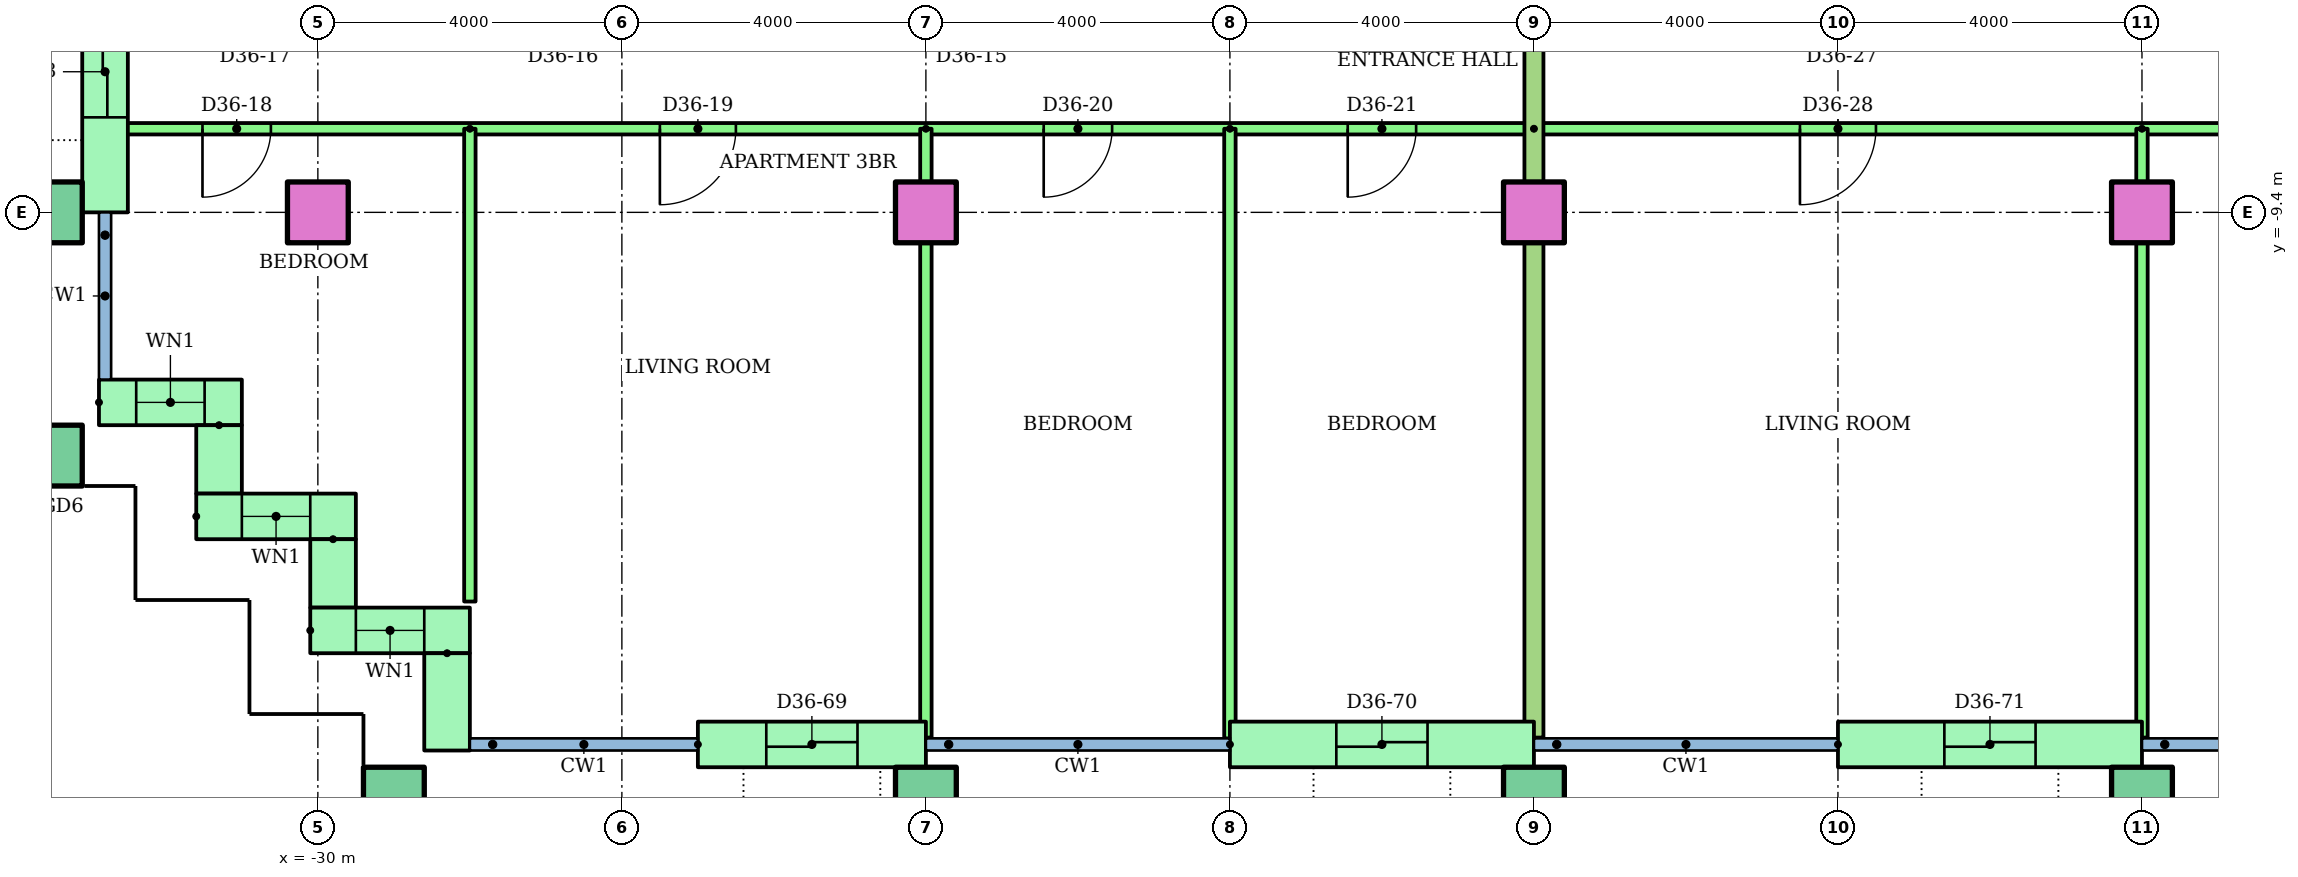
"""IFC4 building model, lengths in metres.
Left out: names, types, materials, properties, quantities, classifications, styles, units other than length and angle.
Written with IfcOpenShell. Run it as: python <this file> out.ifc"""

import sys

from ifc_helpers import new_model, si_unit, direction, frame, frame_2d, origin, origin_2d, place, context, subcontext, project, spatial, rectangle, hollow_rectangle, extrude, element, fill, save


model = new_model("IFC4")
c1 = context("Model", 3, precision=1e-05, world=origin(), true_north=direction((0.0, 1.0)))
c2 = subcontext(c1, "Body", "Model", "MODEL_VIEW")
j1 = project(units=[si_unit("LENGTHUNIT", "METRE"), si_unit("PLANEANGLEUNIT", "RADIAN")], contexts=[c1])
p1 = place(None, origin())
s1 = spatial("IfcSite", under=j1, at=p1, CompositionType="ELEMENT")
p2 = place(p1, origin())
s2 = spatial("IfcBuilding", under=s1, at=p2, CompositionType="ELEMENT")
p3 = place(p2, frame((0.0, 0.0, 139.0)))
s3 = spatial("IfcBuildingStorey", under=s2, at=p3, CompositionType="ELEMENT", Elevation=139.0)
for number, where in (
    (1, (-29.0, -17.1, 0.0)),
    (2, (-22.0, -17.1, 0.0)),
    (3, (-14.0, -17.1, 0.0)),
    (4, (-6.0, -17.1, 0.0)),
    (5, (-33.5, -12.6, 0.0)),
    (6, (-33.5, -9.4, 0.0)),
):
    element("IfcColumn", number, at=place(p3, frame(where)), inside=s3, PredefinedType="COLUMN", context=c2, shape_type="SweptSolid", body=[
        extrude(hollow_rectangle(XDim=0.8, YDim=0.8, WallThickness=0.04, at=origin_2d()), origin(), (0.0, 0.0, 1.0), 3.2),
    ])
for number, where in (
    (7, (-30.0, -9.4, 0.0)),
    (8, (-22.0, -9.4, 0.0)),
    (9, (-14.0, -9.4, 0.0)),
    (10, (-6.0, -9.4, 0.0)),
):
    element("IfcColumn", number, at=place(p3, frame(where)), inside=s3, PredefinedType="COLUMN", context=c2, shape_type="SweptSolid", body=[
        extrude(rectangle(XDim=0.8, YDim=0.8, at=origin_2d()), origin(), (0.0, 0.0, 1.0), 3.2),
    ])
p4 = place(p3, frame((-32.8, -5.7, 0.0), z_axis=(0.0, 0.0, 1.0), x_axis=(0.0, -1.0, 0.0)))
e11 = element("IfcWall", 11, at=p4, inside=s3, PredefinedType="STANDARD", context=c2, shape_type="SweptSolid", body=[
    extrude(rectangle(XDim=3.7, YDim=0.6, at=frame_2d((1.85, 0.0))), origin(), (0.0, 0.0, 1.0), 2.92),
])
p5 = place(p4, frame((1.25, 0.0, 0.0)))
e12 = element("IfcOpeningElement", 12, at=p5, cuts=e11, PredefinedType="OPENING", context=c2, shape_type="SweptSolid", body=[
    extrude(rectangle(XDim=1.2, YDim=2.1, at=frame_2d((0.6, 1.05))), frame((0.0, 0.31, 0.0), z_axis=(0.0, -1.0, 0.0), x_axis=(1.0, 0.0, 0.0)), (0.0, 0.0, 1.0), 0.62),
])
p6 = place(p3, frame((-32.88, -11.9, 0.0)))
e13 = element("IfcWall", 13, at=p6, inside=s3, PredefinedType="STANDARD", context=c2, shape_type="SweptSolid", body=[
    extrude(rectangle(XDim=1.88, YDim=0.6, at=frame_2d((0.94, 0.0))), origin(), (0.0, 0.0, 1.0), 2.92),
])
p7 = place(p6, frame((0.49, 0.0, 0.9)))
e14 = element("IfcOpeningElement", 14, at=p7, cuts=e13, PredefinedType="OPENING", context=c2, shape_type="SweptSolid", body=[
    extrude(rectangle(XDim=0.9, YDim=1.5, at=frame_2d((0.45, 0.75))), frame((0.0, 0.31, 0.0), z_axis=(0.0, -1.0, 0.0), x_axis=(1.0, 0.0, 0.0)), (0.0, 0.0, 1.0), 0.62),
])
p8 = place(p3, frame((-31.3, -12.2, 0.0), z_axis=(0.0, 0.0, 1.0), x_axis=(0.0, -1.0, 0.0)))
e15 = element("IfcWall", 15, at=p8, inside=s3, PredefinedType="STANDARD", context=c2, shape_type="SweptSolid", body=[
    extrude(rectangle(XDim=0.9, YDim=0.6, at=frame_2d((0.45, 0.0))), origin(), (0.0, 0.0, 1.0), 2.92),
])
p9 = place(p3, frame((-31.6, -13.4, 0.0)))
e16 = element("IfcWall", 16, at=p9, inside=s3, PredefinedType="STANDARD", context=c2, shape_type="SweptSolid", body=[
    extrude(rectangle(XDim=2.1, YDim=0.6, at=frame_2d((1.05, 0.0))), origin(), (0.0, 0.0, 1.0), 2.92),
])
p10 = place(p9, frame((0.6, 0.0, 0.9)))
e17 = element("IfcOpeningElement", 17, at=p10, cuts=e16, PredefinedType="OPENING", context=c2, shape_type="SweptSolid", body=[
    extrude(rectangle(XDim=0.9, YDim=1.5, at=frame_2d((0.45, 0.75))), frame((0.0, 0.31, 0.0), z_axis=(0.0, -1.0, 0.0), x_axis=(1.0, 0.0, 0.0)), (0.0, 0.0, 1.0), 0.62),
])
p11 = place(p3, frame((-29.8, -13.7, 0.0), z_axis=(0.0, 0.0, 1.0), x_axis=(0.0, -1.0, 0.0)))
e18 = element("IfcWall", 18, at=p11, inside=s3, PredefinedType="STANDARD", context=c2, shape_type="SweptSolid", body=[
    extrude(rectangle(XDim=0.9, YDim=0.6, at=frame_2d((0.45, 0.0))), origin(), (0.0, 0.0, 1.0), 2.92),
])
p12 = place(p3, frame((-30.1, -14.9, 0.0)))
e19 = element("IfcWall", 19, at=p12, inside=s3, PredefinedType="STANDARD", context=c2, shape_type="SweptSolid", body=[
    extrude(rectangle(XDim=2.1, YDim=0.6, at=frame_2d((1.05, 0.0))), origin(), (0.0, 0.0, 1.0), 2.92),
])
p13 = place(p12, frame((0.6, 0.0, 0.9)))
e20 = element("IfcOpeningElement", 20, at=p13, cuts=e19, PredefinedType="OPENING", context=c2, shape_type="SweptSolid", body=[
    extrude(rectangle(XDim=0.9, YDim=1.5, at=frame_2d((0.45, 0.75))), frame((0.0, 0.31, 0.0), z_axis=(0.0, -1.0, 0.0), x_axis=(1.0, 0.0, 0.0)), (0.0, 0.0, 1.0), 0.62),
])
p14 = place(p3, frame((-28.3, -15.2, 0.0), z_axis=(0.0, 0.0, 1.0), x_axis=(0.0, -1.0, 0.0)))
e21 = element("IfcWall", 21, at=p14, inside=s3, PredefinedType="STANDARD", context=c2, shape_type="SweptSolid", body=[
    extrude(rectangle(XDim=1.28, YDim=0.6, at=frame_2d((0.64, 0.0))), origin(), (0.0, 0.0, 1.0), 2.92),
])
p15 = place(p3, frame((-25.0, -16.4, 0.0)))
e22 = element("IfcWall", 22, at=p15, inside=s3, PredefinedType="STANDARD", context=c2, shape_type="SweptSolid", body=[
    extrude(rectangle(XDim=3.0, YDim=0.6, at=frame_2d((1.5, 0.0))), origin(), (0.0, 0.0, 1.0), 2.92),
])
p16 = place(p15, frame((0.9, 0.0, 0.0)))
e23 = element("IfcOpeningElement", 23, at=p16, cuts=e22, PredefinedType="OPENING", context=c2, shape_type="SweptSolid", body=[
    extrude(rectangle(XDim=1.2, YDim=2.1, at=frame_2d((0.6, 1.05))), frame((0.0, 0.31, 0.0), z_axis=(0.0, -1.0, 0.0), x_axis=(1.0, 0.0, 0.0)), (0.0, 0.0, 1.0), 0.62),
])
p17 = place(p3, frame((-18.0, -16.4, 0.0)))
e24 = element("IfcWall", 24, at=p17, inside=s3, PredefinedType="STANDARD", context=c2, shape_type="SweptSolid", body=[
    extrude(rectangle(XDim=4.0, YDim=0.6, at=frame_2d((2.0, 0.0))), origin(), (0.0, 0.0, 1.0), 2.92),
])
p18 = place(p17, frame((1.4, 0.0, 0.0)))
e25 = element("IfcOpeningElement", 25, at=p18, cuts=e24, PredefinedType="OPENING", context=c2, shape_type="SweptSolid", body=[
    extrude(rectangle(XDim=1.2, YDim=2.1, at=frame_2d((0.6, 1.05))), frame((0.0, 0.31, 0.0), z_axis=(0.0, -1.0, 0.0), x_axis=(1.0, 0.0, 0.0)), (0.0, 0.0, 1.0), 0.62),
])
p19 = place(p3, frame((-10.0, -16.4, 0.0)))
e26 = element("IfcWall", 26, at=p19, inside=s3, PredefinedType="STANDARD", context=c2, shape_type="SweptSolid", body=[
    extrude(rectangle(XDim=4.0, YDim=0.6, at=frame_2d((2.0, 0.0))), origin(), (0.0, 0.0, 1.0), 2.92),
])
p20 = place(p19, frame((1.4, 0.0, 0.0)))
e27 = element("IfcOpeningElement", 27, at=p20, cuts=e26, PredefinedType="OPENING", context=c2, shape_type="SweptSolid", body=[
    extrude(rectangle(XDim=1.2, YDim=2.1, at=frame_2d((0.6, 1.05))), frame((0.0, 0.31, 0.0), z_axis=(0.0, -1.0, 0.0), x_axis=(1.0, 0.0, 0.0)), (0.0, 0.0, 1.0), 0.62),
])
p21 = place(p3, frame((-14.0, -8.3, 0.0), z_axis=(0.0, 0.0, 1.0), x_axis=(-1.0, 0.0, 0.0)))
e28 = element("IfcWall", 28, at=p21, inside=s3, PredefinedType="PARTITIONING", context=c2, shape_type="SweptSolid", body=[
    extrude(rectangle(XDim=18.71, YDim=0.15, at=frame_2d((9.355, 0.0))), origin(), (0.0, 0.0, 1.0), 2.4),
])
p22 = place(p21, frame((16.618, 0.0, 0.0)))
e29 = element("IfcOpeningElement", 29, at=p22, cuts=e28, PredefinedType="OPENING", context=c2, shape_type="SweptSolid", body=[
    extrude(rectangle(XDim=0.9, YDim=2.1, at=frame_2d((0.45, 1.05))), frame((0.0, 0.085, 0.0), z_axis=(0.0, -1.0, 0.0), x_axis=(1.0, 0.0, 0.0)), (0.0, 0.0, 1.0), 0.17),
])
p23 = place(p21, frame((10.5, 0.0, 0.0)))
e30 = element("IfcOpeningElement", 30, at=p23, cuts=e28, PredefinedType="OPENING", context=c2, shape_type="SweptSolid", body=[
    extrude(rectangle(XDim=1.0, YDim=2.1, at=frame_2d((0.5, 1.05))), frame((0.0, 0.085, 0.0), z_axis=(0.0, -1.0, 0.0), x_axis=(1.0, 0.0, 0.0)), (0.0, 0.0, 1.0), 0.17),
])
p24 = place(p21, frame((5.55, 0.0, 0.0)))
e31 = element("IfcOpeningElement", 31, at=p24, cuts=e28, PredefinedType="OPENING", context=c2, shape_type="SweptSolid", body=[
    extrude(rectangle(XDim=0.9, YDim=2.1, at=frame_2d((0.45, 1.05))), frame((0.0, 0.085, 0.0), z_axis=(0.0, -1.0, 0.0), x_axis=(1.0, 0.0, 0.0)), (0.0, 0.0, 1.0), 0.17),
])
p25 = place(p21, frame((1.55, 0.0, 0.0)))
e32 = element("IfcOpeningElement", 32, at=p25, cuts=e28, PredefinedType="OPENING", context=c2, shape_type="SweptSolid", body=[
    extrude(rectangle(XDim=0.9, YDim=2.1, at=frame_2d((0.45, 1.05))), frame((0.0, 0.085, 0.0), z_axis=(0.0, -1.0, 0.0), x_axis=(1.0, 0.0, 0.0)), (0.0, 0.0, 1.0), 0.17),
])
p26 = place(p3, frame((-28.0, -8.3, 0.0), z_axis=(0.0, 0.0, 1.0), x_axis=(0.0, -1.0, 0.0)))
e33 = element("IfcWall", 33, at=p26, inside=s3, PredefinedType="PARTITIONING", context=c2, shape_type="SweptSolid", body=[
    extrude(rectangle(XDim=6.22, YDim=0.15, at=frame_2d((3.11, 0.0))), origin(), (0.0, 0.0, 1.0), 2.4),
])
p27 = place(p3, frame((-22.0, -8.3, 0.0), z_axis=(0.0, 0.0, 1.0), x_axis=(0.0, -1.0, 0.0)))
e34 = element("IfcWall", 34, at=p27, inside=s3, PredefinedType="PARTITIONING", context=c2, shape_type="SweptSolid", body=[
    extrude(rectangle(XDim=8.01, YDim=0.15, at=frame_2d((4.005, 0.0))), origin(), (0.0, 0.0, 1.0), 2.4),
])
p28 = place(p3, frame((-18.0, -8.3, 0.0), z_axis=(0.0, 0.0, 1.0), x_axis=(0.0, -1.0, 0.0)))
e35 = element("IfcWall", 35, at=p28, inside=s3, PredefinedType="PARTITIONING", context=c2, shape_type="SweptSolid", body=[
    extrude(rectangle(XDim=8.021, YDim=0.15, at=frame_2d((4.01, 0.0))), origin(), (0.0, 0.0, 1.0), 2.4),
])
p29 = place(p3, frame((10.0, -8.3, 0.0), z_axis=(0.0, 0.0, 1.0), x_axis=(-1.0, 0.0, 0.0)))
e36 = element("IfcWall", 36, at=p29, inside=s3, PredefinedType="PARTITIONING", context=c2, shape_type="SweptSolid", body=[
    extrude(rectangle(XDim=24.0, YDim=0.15, at=frame_2d((12.0, 0.0))), origin(), (0.0, 0.0, 1.0), 2.4),
])
p30 = place(p29, frame((19.5, 0.0, 0.0)))
e37 = element("IfcOpeningElement", 37, at=p30, cuts=e36, PredefinedType="OPENING", context=c2, shape_type="SweptSolid", body=[
    extrude(rectangle(XDim=1.0, YDim=2.1, at=frame_2d((0.5, 1.05))), frame((0.0, 0.085, 0.0), z_axis=(0.0, -1.0, 0.0), x_axis=(1.0, 0.0, 0.0)), (0.0, 0.0, 1.0), 0.17),
])
p31 = place(p29, frame((13.55, 0.0, 0.0)))
e38 = element("IfcOpeningElement", 38, at=p31, cuts=e36, PredefinedType="OPENING", context=c2, shape_type="SweptSolid", body=[
    extrude(rectangle(XDim=0.9, YDim=2.1, at=frame_2d((0.45, 1.05))), frame((0.0, 0.085, 0.0), z_axis=(0.0, -1.0, 0.0), x_axis=(1.0, 0.0, 0.0)), (0.0, 0.0, 1.0), 0.17),
])
p32 = place(p29, frame((9.55, 0.0, 0.0)))
e39 = element("IfcOpeningElement", 39, at=p32, cuts=e36, PredefinedType="OPENING", context=c2, shape_type="SweptSolid", body=[
    extrude(rectangle(XDim=0.9, YDim=2.1, at=frame_2d((0.45, 1.05))), frame((0.0, 0.085, 0.0), z_axis=(0.0, -1.0, 0.0), x_axis=(1.0, 0.0, 0.0)), (0.0, 0.0, 1.0), 0.17),
])
p33 = place(p29, frame((5.55, 0.0, 0.0)))
e40 = element("IfcOpeningElement", 40, at=p33, cuts=e36, PredefinedType="OPENING", context=c2, shape_type="SweptSolid", body=[
    extrude(rectangle(XDim=0.9, YDim=2.1, at=frame_2d((0.45, 1.05))), frame((0.0, 0.085, 0.0), z_axis=(0.0, -1.0, 0.0), x_axis=(1.0, 0.0, 0.0)), (0.0, 0.0, 1.0), 0.17),
])
p34 = place(p29, frame((1.55, 0.0, 0.0)))
e41 = element("IfcOpeningElement", 41, at=p34, cuts=e36, PredefinedType="OPENING", context=c2, shape_type="SweptSolid", body=[
    extrude(rectangle(XDim=0.9, YDim=2.1, at=frame_2d((0.45, 1.05))), frame((0.0, 0.085, 0.0), z_axis=(0.0, -1.0, 0.0), x_axis=(1.0, 0.0, 0.0)), (0.0, 0.0, 1.0), 0.17),
])
p35 = place(p3, frame((-6.0, -8.3, 0.0), z_axis=(0.0, 0.0, 1.0), x_axis=(0.0, -1.0, 0.0)))
e42 = element("IfcWall", 42, at=p35, inside=s3, PredefinedType="PARTITIONING", context=c2, shape_type="SweptSolid", body=[
    extrude(rectangle(XDim=8.01, YDim=0.15, at=frame_2d((4.005, 0.0))), origin(), (0.0, 0.0, 1.0), 2.4),
])
p36 = place(p3, frame((-14.0, -1.4, 0.0), z_axis=(0.0, 0.0, 1.0), x_axis=(0.0, -1.0, 0.0)))
e43 = element("IfcWall", 43, at=p36, inside=s3, PredefinedType="PARTITIONING", context=c2, shape_type="SweptSolid", body=[
    extrude(rectangle(XDim=14.91, YDim=0.25, at=frame_2d((7.455, 0.0))), origin(), (0.0, 0.0, 1.0), 2.4),
])
p37 = place(p7, origin())
e44 = element("IfcWindow", 44, at=p37, inside=s3, PartitioningType="SINGLE_PANEL", PredefinedType="WINDOW", context=c2, shape_type="SweptSolid", body=[
    extrude(rectangle(XDim=0.9, YDim=1.5, at=frame_2d((0.45, 0.75))), frame((0.0, 0.03, 0.0), z_axis=(0.0, -1.0, 0.0), x_axis=(1.0, 0.0, 0.0)), (0.0, 0.0, 1.0), 0.06),
])
fill(e14, e44)
p38 = place(p10, origin())
e45 = element("IfcWindow", 45, at=p38, inside=s3, PartitioningType="SINGLE_PANEL", PredefinedType="WINDOW", context=c2, shape_type="SweptSolid", body=[
    extrude(rectangle(XDim=0.9, YDim=1.5, at=frame_2d((0.45, 0.75))), frame((0.0, 0.03, 0.0), z_axis=(0.0, -1.0, 0.0), x_axis=(1.0, 0.0, 0.0)), (0.0, 0.0, 1.0), 0.06),
])
fill(e17, e45)
p39 = place(p13, origin())
e46 = element("IfcWindow", 46, at=p39, inside=s3, PartitioningType="SINGLE_PANEL", PredefinedType="WINDOW", context=c2, shape_type="SweptSolid", body=[
    extrude(rectangle(XDim=0.9, YDim=1.5, at=frame_2d((0.45, 0.75))), frame((0.0, 0.03, 0.0), z_axis=(0.0, -1.0, 0.0), x_axis=(1.0, 0.0, 0.0)), (0.0, 0.0, 1.0), 0.06),
])
fill(e20, e46)
p40 = place(p22, origin())
e47 = element("IfcDoor", 47, at=p40, inside=s3, OperationType="SINGLE_SWING_RIGHT", PredefinedType="DOOR", context=c2, shape_type="SweptSolid", body=[
    extrude(rectangle(XDim=0.9, YDim=2.1, at=frame_2d((0.45, 1.05))), frame((0.0, 0.025, 0.0), z_axis=(0.0, -1.0, 0.0), x_axis=(1.0, 0.0, 0.0)), (0.0, 0.0, 1.0), 0.05),
])
fill(e29, e47)
p41 = place(p23, origin())
e48 = element("IfcDoor", 48, at=p41, inside=s3, OperationType="SINGLE_SWING_RIGHT", PredefinedType="DOOR", context=c2, shape_type="SweptSolid", body=[
    extrude(rectangle(XDim=1.0, YDim=2.1, at=frame_2d((0.5, 1.05))), frame((0.0, 0.025, 0.0), z_axis=(0.0, -1.0, 0.0), x_axis=(1.0, 0.0, 0.0)), (0.0, 0.0, 1.0), 0.05),
])
fill(e30, e48)
p42 = place(p24, origin())
e49 = element("IfcDoor", 49, at=p42, inside=s3, OperationType="SINGLE_SWING_RIGHT", PredefinedType="DOOR", context=c2, shape_type="SweptSolid", body=[
    extrude(rectangle(XDim=0.9, YDim=2.1, at=frame_2d((0.45, 1.05))), frame((0.0, 0.025, 0.0), z_axis=(0.0, -1.0, 0.0), x_axis=(1.0, 0.0, 0.0)), (0.0, 0.0, 1.0), 0.05),
])
fill(e31, e49)
p43 = place(p25, origin())
e50 = element("IfcDoor", 50, at=p43, inside=s3, OperationType="SINGLE_SWING_RIGHT", PredefinedType="DOOR", context=c2, shape_type="SweptSolid", body=[
    extrude(rectangle(XDim=0.9, YDim=2.1, at=frame_2d((0.45, 1.05))), frame((0.0, 0.025, 0.0), z_axis=(0.0, -1.0, 0.0), x_axis=(1.0, 0.0, 0.0)), (0.0, 0.0, 1.0), 0.05),
])
fill(e32, e50)
p44 = place(p30, origin())
e51 = element("IfcDoor", 51, at=p44, inside=s3, OperationType="SINGLE_SWING_RIGHT", PredefinedType="DOOR", context=c2, shape_type="SweptSolid", body=[
    extrude(rectangle(XDim=1.0, YDim=2.1, at=frame_2d((0.5, 1.05))), frame((0.0, 0.025, 0.0), z_axis=(0.0, -1.0, 0.0), x_axis=(1.0, 0.0, 0.0)), (0.0, 0.0, 1.0), 0.05),
])
fill(e37, e51)
p45 = place(p5, origin())
e52 = element("IfcDoor", 52, at=p45, inside=s3, OperationType="SLIDING_TO_LEFT", PredefinedType="DOOR", context=c2, shape_type="SweptSolid", body=[
    extrude(rectangle(XDim=1.2, YDim=2.1, at=frame_2d((0.6, 1.05))), frame((0.0, 0.025, 0.0), z_axis=(0.0, -1.0, 0.0), x_axis=(1.0, 0.0, 0.0)), (0.0, 0.0, 1.0), 0.05),
])
fill(e12, e52)
p46 = place(p16, origin())
e53 = element("IfcDoor", 53, at=p46, inside=s3, OperationType="SLIDING_TO_LEFT", PredefinedType="DOOR", context=c2, shape_type="SweptSolid", body=[
    extrude(rectangle(XDim=1.2, YDim=2.1, at=frame_2d((0.6, 1.05))), frame((0.0, 0.025, 0.0), z_axis=(0.0, -1.0, 0.0), x_axis=(1.0, 0.0, 0.0)), (0.0, 0.0, 1.0), 0.05),
])
fill(e23, e53)
p47 = place(p18, origin())
e54 = element("IfcDoor", 54, at=p47, inside=s3, OperationType="SLIDING_TO_LEFT", PredefinedType="DOOR", context=c2, shape_type="SweptSolid", body=[
    extrude(rectangle(XDim=1.2, YDim=2.1, at=frame_2d((0.6, 1.05))), frame((0.0, 0.025, 0.0), z_axis=(0.0, -1.0, 0.0), x_axis=(1.0, 0.0, 0.0)), (0.0, 0.0, 1.0), 0.05),
])
fill(e25, e54)
p48 = place(p20, origin())
e55 = element("IfcDoor", 55, at=p48, inside=s3, OperationType="SLIDING_TO_LEFT", PredefinedType="DOOR", context=c2, shape_type="SweptSolid", body=[
    extrude(rectangle(XDim=1.2, YDim=2.1, at=frame_2d((0.6, 1.05))), frame((0.0, 0.025, 0.0), z_axis=(0.0, -1.0, 0.0), x_axis=(1.0, 0.0, 0.0)), (0.0, 0.0, 1.0), 0.05),
])
fill(e27, e55)
save(model, sys.argv[1])
